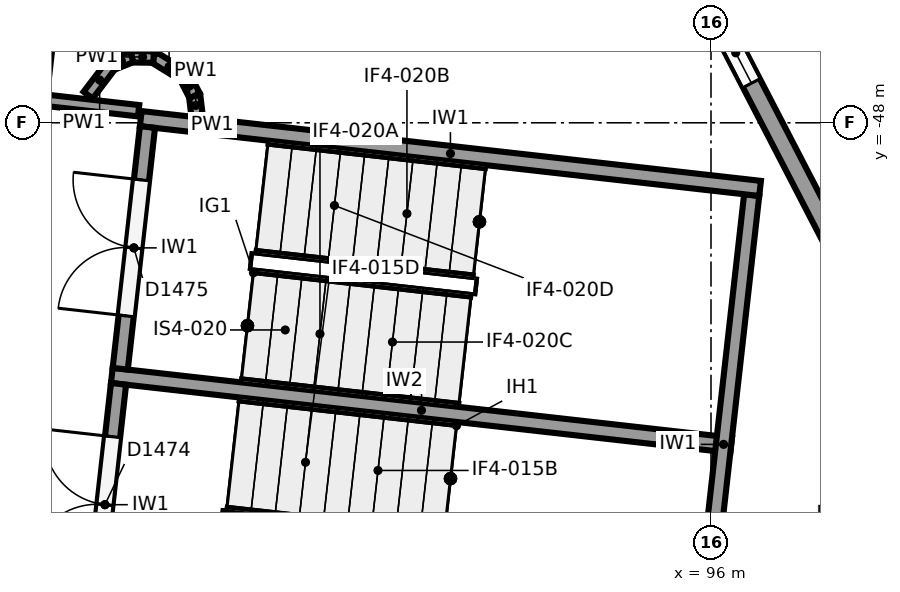
"""IFC4 building model, lengths in metres.
Left out: names, types, materials, properties, quantities, classifications, styles, units other than length and angle.
Written with IfcOpenShell. Run it as: python <this file> out.ifc"""

import sys

from ifc_helpers import new_model, si_unit, direction, frame, frame_2d, origin, place, context, subcontext, project, spatial, rectangle, extrude, element, fill, save


model = new_model("IFC4")
c1 = context("Model", 3, precision=1e-05, world=origin(), true_north=direction((0.0, 1.0)))
c2 = subcontext(c1, "Body", "Model", "MODEL_VIEW")
j1 = project(units=[si_unit("LENGTHUNIT", "METRE"), si_unit("PLANEANGLEUNIT", "RADIAN")], contexts=[c1])
p1 = place(None, origin())
s1 = spatial("IfcSite", under=j1, at=p1, CompositionType="ELEMENT")
p2 = place(p1, origin())
s2 = spatial("IfcBuilding", under=s1, at=p2, CompositionType="ELEMENT")
p3 = place(p2, frame((0.0, 0.0, 18.0)))
s3 = spatial("IfcBuildingStorey", under=s2, at=p3, CompositionType="ELEMENT", Elevation=18.0)
p4 = place(p3, frame((94.807, -44.149, 0.0), z_axis=(0.0, 0.0, 1.0), x_axis=(0.460021193284, -0.887907935391, 0.0)))
e1 = element("IfcWall", 1, at=p4, inside=s3, PredefinedType="SOLIDWALL", context=c2, shape_type="SweptSolid", body=[
    extrude(rectangle(XDim=13.075, YDim=0.25, at=frame_2d((6.538, 0.0))), origin(), (0.0, 0.0, 1.0), 4.3),
])
p5 = place(p4, frame((0.75, 0.0, 1.0)))
e2 = element("IfcOpeningElement", 2, at=p5, cuts=e1, PredefinedType="OPENING", context=c2, shape_type="SweptSolid", body=[
    extrude(rectangle(XDim=0.9, YDim=3.25, at=frame_2d((0.45, 1.625))), frame((0.0, 0.135, 0.0), z_axis=(0.0, -1.0, 0.0), x_axis=(1.0, 0.0, 0.0)), (0.0, 0.0, 1.0), 0.27),
])
p6 = place(p4, frame((2.85, 0.0, 1.0)))
e3 = element("IfcOpeningElement", 3, at=p6, cuts=e1, PredefinedType="OPENING", context=c2, shape_type="SweptSolid", body=[
    extrude(rectangle(XDim=0.9, YDim=3.25, at=frame_2d((0.45, 1.625))), frame((0.0, 0.135, 0.0), z_axis=(0.0, -1.0, 0.0), x_axis=(1.0, 0.0, 0.0)), (0.0, 0.0, 1.0), 0.27),
])
p7 = place(p4, frame((11.25, 0.0, 1.0)))
e4 = element("IfcOpeningElement", 4, at=p7, cuts=e1, PredefinedType="OPENING", context=c2, shape_type="SweptSolid", body=[
    extrude(rectangle(XDim=0.9, YDim=3.25, at=frame_2d((0.45, 1.625))), frame((0.0, 0.135, 0.0), z_axis=(0.0, -1.0, 0.0), x_axis=(1.0, 0.0, 0.0)), (0.0, 0.0, 1.0), 0.27),
])
p8 = place(p3, frame((96.646, -48.863, 0.0), z_axis=(0.0, 0.0, 1.0), x_axis=(-0.993714104693, 0.111947658007, 0.0)))
e5 = element("IfcWall", 5, at=p8, inside=s3, PredefinedType="SHEAR", context=c2, shape_type="SweptSolid", body=[
    extrude(rectangle(XDim=8.2, YDim=0.2, at=frame_2d((4.1, 0.0))), origin(), (0.0, 0.0, 1.0), 5.6),
])
p9 = place(p3, frame((95.796, -55.51, 0.0), z_axis=(0.0, 0.0, 1.0), x_axis=(0.111970106426, 0.993711575492, 0.0)))
e6 = element("IfcWall", 6, at=p9, inside=s3, PredefinedType="SHEAR", context=c2, shape_type="SweptSolid", body=[
    extrude(rectangle(XDim=6.6, YDim=0.2, at=frame_2d((3.3, 0.0))), origin(), (0.0, 0.0, 1.0), 5.6),
])
p10 = place(p3, frame((96.265, -52.242, 0.0), z_axis=(0.0, 0.0, 1.0), x_axis=(-0.993713731549, 0.111950970206, 0.0)))
e7 = element("IfcWall", 7, at=p10, inside=s3, PredefinedType="SHEAR", context=c2, shape_type="SweptSolid", body=[
    extrude(rectangle(XDim=8.2, YDim=0.2, at=frame_2d((4.1, 0.0))), origin(), (0.0, 0.0, 1.0), 5.6),
])
p11 = place(p3, frame((87.846, -54.614, 0.0), z_axis=(0.0, 0.0, 1.0), x_axis=(0.112005735442, 0.993707560215, 0.0)))
e8 = element("IfcWall", 8, at=p11, inside=s3, PredefinedType="SHEAR", context=c2, shape_type="SweptSolid", body=[
    extrude(rectangle(XDim=3.2, YDim=0.2, at=frame_2d((1.6, 0.0))), origin(), (0.0, 0.0, 1.0), 5.6),
])
p12 = place(p11, frame((0.7, 0.0, 0.0)))
e9 = element("IfcOpeningElement", 9, at=p12, cuts=e8, PredefinedType="OPENING", context=c2, shape_type="SweptSolid", body=[
    extrude(rectangle(XDim=1.8, YDim=2.1, at=frame_2d((0.9, 1.05))), frame((0.0, 0.11, 0.0), z_axis=(0.0, -1.0, 0.0), x_axis=(1.0, 0.0, 0.0)), (0.0, 0.0, 1.0), 0.22),
])
p13 = place(p3, frame((88.227, -51.236, 0.0), z_axis=(0.0, 0.0, 1.0), x_axis=(0.111930393474, 0.993716049491, 0.0)))
e10 = element("IfcWall", 10, at=p13, inside=s3, PredefinedType="SHEAR", context=c2, shape_type="SweptSolid", body=[
    extrude(rectangle(XDim=3.2, YDim=0.2, at=frame_2d((1.6, 0.0))), origin(), (0.0, 0.0, 1.0), 5.6),
])
p14 = place(p13, frame((0.7, 0.0, 0.0)))
e11 = element("IfcOpeningElement", 11, at=p14, cuts=e10, PredefinedType="OPENING", context=c2, shape_type="SweptSolid", body=[
    extrude(rectangle(XDim=1.8, YDim=2.1, at=frame_2d((0.9, 1.05))), frame((0.0, 0.11, 0.0), z_axis=(0.0, -1.0, 0.0), x_axis=(1.0, 0.0, 0.0)), (0.0, 0.0, 1.0), 0.22),
])
p15 = place(p3, frame((88.469, -47.841, 0.0), z_axis=(0.0, 0.0, 1.0), x_axis=(-0.993720107873, 0.111894357364, 0.0)))
e12 = element("IfcWall", 12, at=p15, inside=s3, PredefinedType="PARTITIONING", context=c2, shape_type="SweptSolid", body=[
    extrude(rectangle(XDim=3.48, YDim=0.15, at=frame_2d((1.74, 0.0))), origin(), (0.0, 0.0, 1.0), 5.6),
])
p16 = place(p15, frame((1.2, 0.0, 0.0)))
e13 = element("IfcOpeningElement", 13, at=p16, cuts=e12, PredefinedType="OPENING", context=c2, shape_type="SweptSolid", body=[
    extrude(rectangle(XDim=1.0, YDim=2.1, at=frame_2d((0.5, 1.05))), frame((0.0, 0.085, 0.0), z_axis=(0.0, -1.0, 0.0), x_axis=(1.0, 0.0, 0.0)), (0.0, 0.0, 1.0), 0.17),
])
p17 = place(p3, frame((89.237, -47.899, 0.0), z_axis=(0.0, 0.0, 1.0), x_axis=(-0.120303078009, 0.992737210656, 0.0)))
e14 = element("IfcWall", 14, at=p17, inside=s3, PredefinedType="PARTITIONING", context=c2, shape_type="SweptSolid", body=[
    extrude(rectangle(XDim=0.258, YDim=0.15, at=frame_2d((0.129, 0.0))), origin(), (0.0, 0.0, 1.0), 5.6),
])
p18 = place(p3, frame((89.206, -47.644, 0.0), z_axis=(0.0, 0.0, 1.0), x_axis=(-0.458707712007, 0.888587212909, 0.0)))
e15 = element("IfcWall", 15, at=p18, inside=s3, PredefinedType="PARTITIONING", context=c2, shape_type="SweptSolid", body=[
    extrude(rectangle(XDim=0.288, YDim=0.15, at=frame_2d((0.144, 0.0))), origin(), (0.0, 0.0, 1.0), 5.6),
])
p19 = place(p3, frame((89.074, -47.388, 0.0), z_axis=(0.0, 0.0, 1.0), x_axis=(-0.850449593678, 0.526056545072, 0.0)))
e16 = element("IfcWall", 16, at=p19, inside=s3, PredefinedType="PARTITIONING", context=c2, shape_type="SweptSolid", body=[
    extrude(rectangle(XDim=0.479, YDim=0.15, at=frame_2d((0.24, 0.0))), origin(), (0.0, 0.0, 1.0), 5.6),
])
for number, where, z_axis, x_axis in (
    (17, (88.666, -47.135, 0.0), (0.0, 0.0, 1.0), (-1.0, 0.014, 0.0)),
    (18, (88.377, -47.132, 0.0), (0.0, 0.0, 1.0), (-0.929, -0.369, 0.0)),
):
    element("IfcWall", number, at=place(p3, frame(where, z_axis=z_axis, x_axis=x_axis)), inside=s3, PredefinedType="PARTITIONING", context=c2, shape_type="SweptSolid", body=[
        extrude(rectangle(XDim=0.289, YDim=0.15, at=frame_2d((0.145, 0.0))), origin(), (0.0, 0.0, 1.0), 5.6),
    ])
p20 = place(p3, frame((88.108, -47.238, 0.0), z_axis=(0.0, 0.0, 1.0), x_axis=(-0.605293482024, -0.79600238732, 0.0)))
e19 = element("IfcWall", 19, at=p20, inside=s3, PredefinedType="PARTITIONING", context=c2, shape_type="SweptSolid", body=[
    extrude(rectangle(XDim=0.5, YDim=0.15, at=frame_2d((0.25, 0.0))), origin(), (0.0, 0.0, 1.0), 5.6),
])
p21 = place(p6, origin())
e20 = element("IfcWindow", 20, at=p21, inside=s3, PartitioningType="SINGLE_PANEL", PredefinedType="WINDOW", context=c2, shape_type="SweptSolid", body=[
    extrude(rectangle(XDim=0.9, YDim=3.25, at=frame_2d((0.45, 1.625))), frame((0.0, 0.03, 0.0), z_axis=(0.0, -1.0, 0.0), x_axis=(1.0, 0.0, 0.0)), (0.0, 0.0, 1.0), 0.06),
])
fill(e3, e20)
p22 = place(p12, origin())
e21 = element("IfcDoor", 21, at=p22, inside=s3, OperationType="DOUBLE_DOOR_SINGLE_SWING", PredefinedType="DOOR", context=c2, shape_type="SweptSolid", body=[
    extrude(rectangle(XDim=1.8, YDim=2.1, at=frame_2d((0.9, 1.05))), frame((0.0, 0.025, 0.0), z_axis=(0.0, -1.0, 0.0), x_axis=(1.0, 0.0, 0.0)), (0.0, 0.0, 1.0), 0.05),
])
fill(e9, e21)
p23 = place(p14, origin())
e22 = element("IfcDoor", 22, at=p23, inside=s3, OperationType="DOUBLE_DOOR_SINGLE_SWING", PredefinedType="DOOR", context=c2, shape_type="SweptSolid", body=[
    extrude(rectangle(XDim=1.8, YDim=2.1, at=frame_2d((0.9, 1.05))), frame((0.0, 0.025, 0.0), z_axis=(0.0, -1.0, 0.0), x_axis=(1.0, 0.0, 0.0)), (0.0, 0.0, 1.0), 0.05),
])
fill(e11, e22)
save(model, sys.argv[1])
